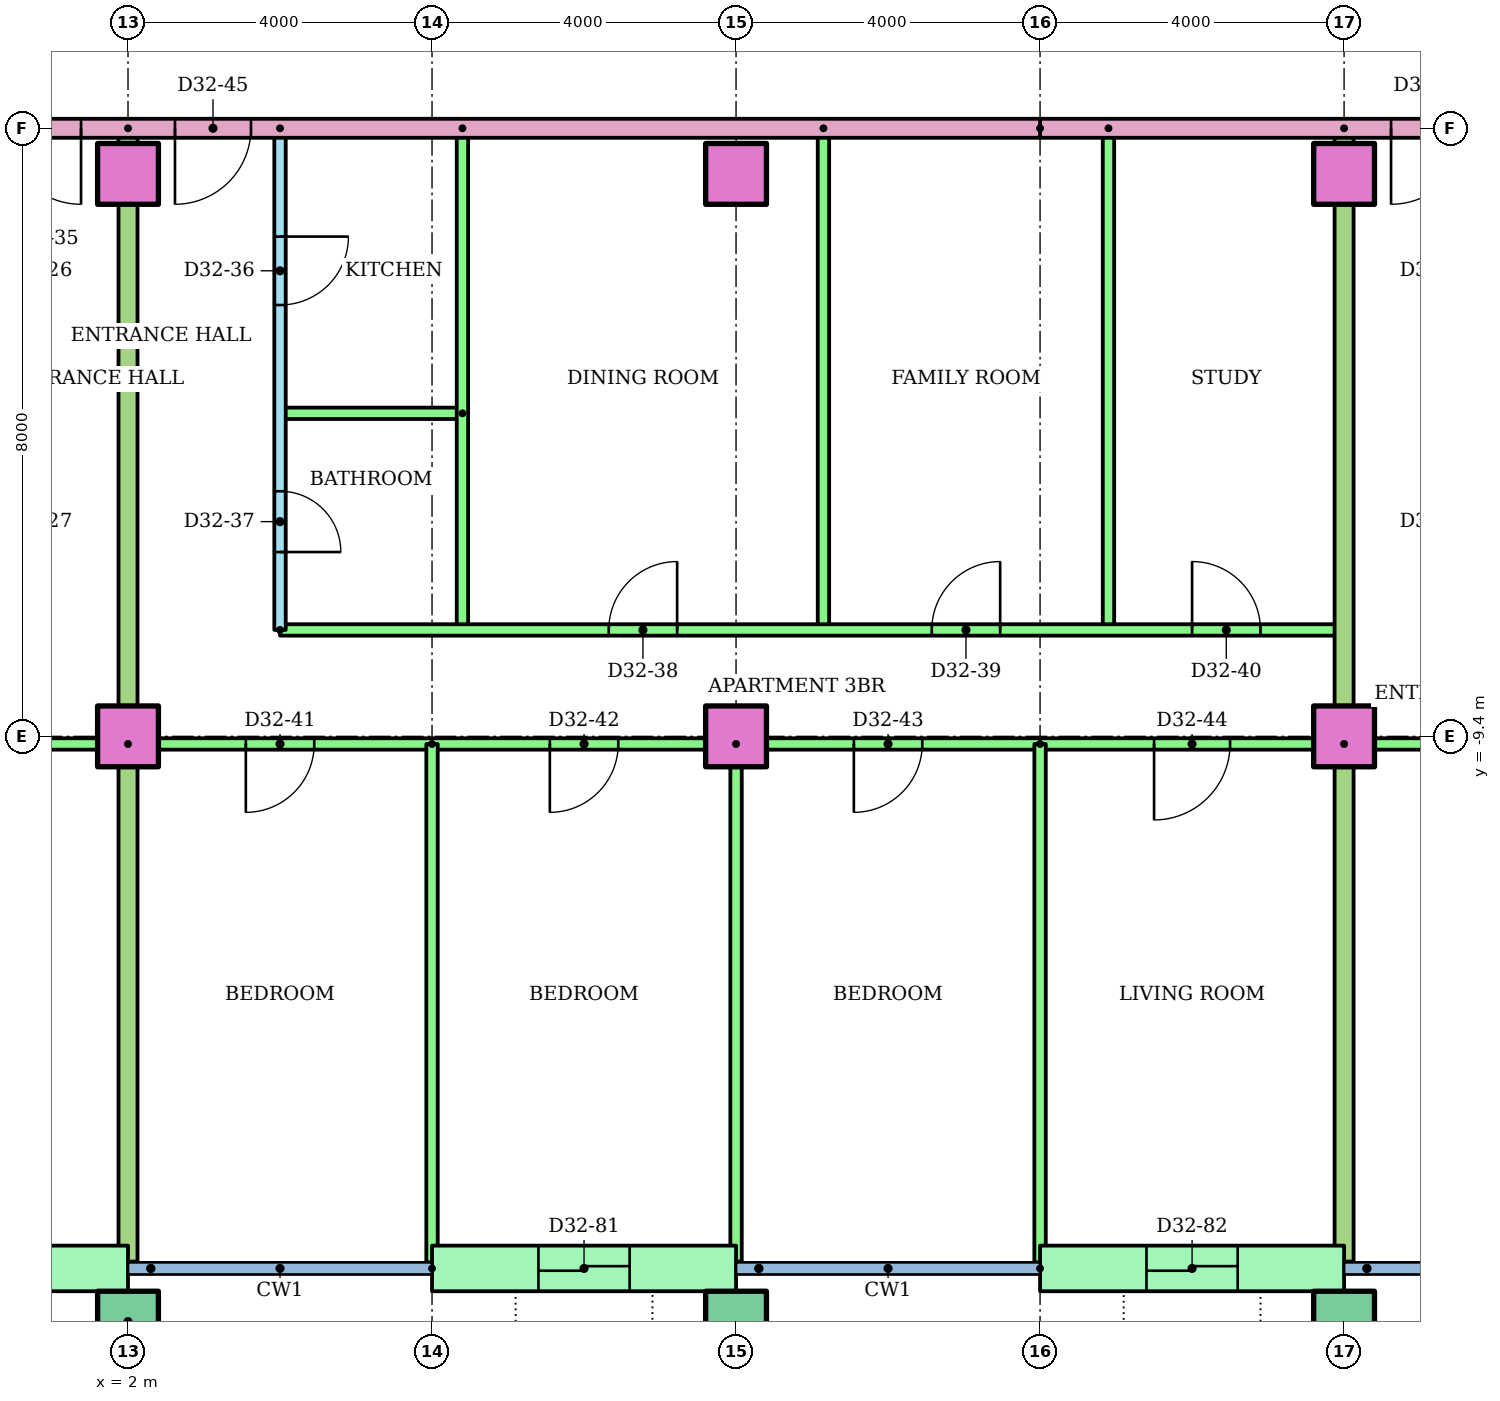
"""IFC4 building model, lengths in metres.
Left out: names, types, materials, properties, quantities, classifications, styles, units other than length and angle.
Written with IfcOpenShell. Run it as: python <this file> out.ifc"""

import sys

from ifc_helpers import new_model, si_unit, direction, frame, frame_2d, origin, origin_2d, place, context, subcontext, project, spatial, rectangle, hollow_rectangle, extrude, element, fill, save


model = new_model("IFC4")
c1 = context("Model", 3, precision=1e-05, world=origin(), true_north=direction((0.0, 1.0)))
c2 = subcontext(c1, "Body", "Model", "MODEL_VIEW")
j1 = project(units=[si_unit("LENGTHUNIT", "METRE"), si_unit("PLANEANGLEUNIT", "RADIAN")], contexts=[c1])
p1 = place(None, origin())
s1 = spatial("IfcSite", under=j1, at=p1, CompositionType="ELEMENT")
p2 = place(p1, origin())
s2 = spatial("IfcBuilding", under=s1, at=p2, CompositionType="ELEMENT")
p3 = place(p2, frame((0.0, 0.0, 126.2)))
s3 = spatial("IfcBuildingStorey", under=s2, at=p3, CompositionType="ELEMENT", Elevation=126.2)
for number, where in (
    (1, (2.0, -17.1, 0.0)),
    (2, (10.0, -17.1, 0.0)),
    (3, (18.0, -17.1, 0.0)),
):
    element("IfcColumn", number, at=place(p3, frame(where)), inside=s3, PredefinedType="COLUMN", context=c2, shape_type="SweptSolid", body=[
        extrude(hollow_rectangle(XDim=0.8, YDim=0.8, WallThickness=0.04, at=origin_2d()), origin(), (0.0, 0.0, 1.0), 3.2),
    ])
for number, where in (
    (4, (2.0, -9.4, 0.0)),
    (5, (10.0, -9.4, 0.0)),
    (6, (18.0, -9.4, 0.0)),
    (7, (2.0, -2.0, 0.0)),
    (8, (10.0, -2.0, 0.0)),
    (9, (18.0, -2.0, 0.0)),
):
    element("IfcColumn", number, at=place(p3, frame(where)), inside=s3, PredefinedType="COLUMN", context=c2, shape_type="SweptSolid", body=[
        extrude(rectangle(XDim=0.8, YDim=0.8, at=origin_2d()), origin(), (0.0, 0.0, 1.0), 3.2),
    ])
p4 = place(p3, frame((-2.0, -16.4, 0.0)))
e10 = element("IfcWall", 10, at=p4, inside=s3, PredefinedType="STANDARD", context=c2, shape_type="SweptSolid", body=[
    extrude(rectangle(XDim=4.0, YDim=0.6, at=frame_2d((2.0, 0.0))), origin(), (0.0, 0.0, 1.0), 2.92),
])
p5 = place(p4, frame((1.4, 0.0, 0.0)))
e11 = element("IfcOpeningElement", 11, at=p5, cuts=e10, PredefinedType="OPENING", context=c2, shape_type="SweptSolid", body=[
    extrude(rectangle(XDim=1.2, YDim=2.1, at=frame_2d((0.6, 1.05))), frame((0.0, 0.31, 0.0), z_axis=(0.0, -1.0, 0.0), x_axis=(1.0, 0.0, 0.0)), (0.0, 0.0, 1.0), 0.62),
])
p6 = place(p3, frame((6.0, -16.4, 0.0)))
e12 = element("IfcWall", 12, at=p6, inside=s3, PredefinedType="STANDARD", context=c2, shape_type="SweptSolid", body=[
    extrude(rectangle(XDim=4.0, YDim=0.6, at=frame_2d((2.0, 0.0))), origin(), (0.0, 0.0, 1.0), 2.92),
])
p7 = place(p6, frame((1.4, 0.0, 0.0)))
e13 = element("IfcOpeningElement", 13, at=p7, cuts=e12, PredefinedType="OPENING", context=c2, shape_type="SweptSolid", body=[
    extrude(rectangle(XDim=1.2, YDim=2.1, at=frame_2d((0.6, 1.05))), frame((0.0, 0.31, 0.0), z_axis=(0.0, -1.0, 0.0), x_axis=(1.0, 0.0, 0.0)), (0.0, 0.0, 1.0), 0.62),
])
p8 = place(p3, frame((14.0, -16.4, 0.0)))
e14 = element("IfcWall", 14, at=p8, inside=s3, PredefinedType="STANDARD", context=c2, shape_type="SweptSolid", body=[
    extrude(rectangle(XDim=4.0, YDim=0.6, at=frame_2d((2.0, 0.0))), origin(), (0.0, 0.0, 1.0), 2.92),
])
p9 = place(p8, frame((1.4, 0.0, 0.0)))
e15 = element("IfcOpeningElement", 15, at=p9, cuts=e14, PredefinedType="OPENING", context=c2, shape_type="SweptSolid", body=[
    extrude(rectangle(XDim=1.2, YDim=2.1, at=frame_2d((0.6, 1.05))), frame((0.0, 0.31, 0.0), z_axis=(0.0, -1.0, 0.0), x_axis=(1.0, 0.0, 0.0)), (0.0, 0.0, 1.0), 0.62),
])
p10 = place(p3, frame((2.0, -9.5, 0.0), z_axis=(0.0, 0.0, 1.0), x_axis=(-1.0, 0.0, 0.0)))
e16 = element("IfcWall", 16, at=p10, inside=s3, PredefinedType="PARTITIONING", context=c2, shape_type="SweptSolid", body=[
    extrude(rectangle(XDim=16.0, YDim=0.15, at=frame_2d((8.0, 0.0))), origin(), (0.0, 0.0, 1.0), 2.4),
])
p11 = place(p10, frame((13.55, 0.0, 0.0)))
e17 = element("IfcOpeningElement", 17, at=p11, cuts=e16, PredefinedType="OPENING", context=c2, shape_type="SweptSolid", body=[
    extrude(rectangle(XDim=0.9, YDim=2.1, at=frame_2d((0.45, 1.05))), frame((0.0, 0.085, 0.0), z_axis=(0.0, -1.0, 0.0), x_axis=(1.0, 0.0, 0.0)), (0.0, 0.0, 1.0), 0.17),
])
p12 = place(p10, frame((9.5, 0.0, 0.0)))
e18 = element("IfcOpeningElement", 18, at=p12, cuts=e16, PredefinedType="OPENING", context=c2, shape_type="SweptSolid", body=[
    extrude(rectangle(XDim=1.0, YDim=2.1, at=frame_2d((0.5, 1.05))), frame((0.0, 0.085, 0.0), z_axis=(0.0, -1.0, 0.0), x_axis=(1.0, 0.0, 0.0)), (0.0, 0.0, 1.0), 0.17),
])
p13 = place(p10, frame((5.55, 0.0, 0.0)))
e19 = element("IfcOpeningElement", 19, at=p13, cuts=e16, PredefinedType="OPENING", context=c2, shape_type="SweptSolid", body=[
    extrude(rectangle(XDim=0.9, YDim=2.1, at=frame_2d((0.45, 1.05))), frame((0.0, 0.085, 0.0), z_axis=(0.0, -1.0, 0.0), x_axis=(1.0, 0.0, 0.0)), (0.0, 0.0, 1.0), 0.17),
])
p14 = place(p10, frame((1.55, 0.0, 0.0)))
e20 = element("IfcOpeningElement", 20, at=p14, cuts=e16, PredefinedType="OPENING", context=c2, shape_type="SweptSolid", body=[
    extrude(rectangle(XDim=0.9, YDim=2.1, at=frame_2d((0.45, 1.05))), frame((0.0, 0.085, 0.0), z_axis=(0.0, -1.0, 0.0), x_axis=(1.0, 0.0, 0.0)), (0.0, 0.0, 1.0), 0.17),
])
p15 = place(p3, frame((4.0, -1.4, 0.0), z_axis=(0.0, 0.0, 1.0), x_axis=(0.0, -1.0, 0.0)))
e21 = element("IfcWall", 21, at=p15, inside=s3, PredefinedType="PARTITIONING", context=c2, shape_type="SweptSolid", body=[
    extrude(rectangle(XDim=6.6, YDim=0.15, at=frame_2d((3.3, 0.0))), origin(), (0.0, 0.0, 1.0), 2.4),
])
p16 = place(p15, frame((1.425, 0.0, 0.0)))
e22 = element("IfcOpeningElement", 22, at=p16, cuts=e21, PredefinedType="OPENING", context=c2, shape_type="SweptSolid", body=[
    extrude(rectangle(XDim=0.9, YDim=2.1, at=frame_2d((0.45, 1.05))), frame((0.0, 0.085, 0.0), z_axis=(0.0, -1.0, 0.0), x_axis=(1.0, 0.0, 0.0)), (0.0, 0.0, 1.0), 0.17),
])
p17 = place(p15, frame((4.775, 0.0, 0.0)))
e23 = element("IfcOpeningElement", 23, at=p17, cuts=e21, PredefinedType="OPENING", context=c2, shape_type="SweptSolid", body=[
    extrude(rectangle(XDim=0.8, YDim=2.1, at=frame_2d((0.4, 1.05))), frame((0.0, 0.085, 0.0), z_axis=(0.0, -1.0, 0.0), x_axis=(1.0, 0.0, 0.0)), (0.0, 0.0, 1.0), 0.17),
])
p18 = place(p3, frame((6.4, -5.15, 0.0), z_axis=(0.0, 0.0, 1.0), x_axis=(-1.0, 0.0, 0.0)))
e24 = element("IfcWall", 24, at=p18, inside=s3, PredefinedType="PARTITIONING", context=c2, shape_type="SweptSolid", body=[
    extrude(rectangle(XDim=2.4, YDim=0.15, at=frame_2d((1.2, 0.0))), origin(), (0.0, 0.0, 1.0), 2.4),
])
for number, where, z_axis, x_axis in (
    (25, (6.4, -1.4, 0.0), (0.0, 0.0, 1.0), (0.0, -1.0, 0.0)),
    (26, (11.15, -1.4, 0.0), (0.0, 0.0, 1.0), (0.0, -1.0, 0.0)),
    (27, (14.9, -1.4, 0.0), (0.0, 0.0, 1.0), (0.0, -1.0, 0.0)),
):
    element("IfcWall", number, at=place(p3, frame(where, z_axis=z_axis, x_axis=x_axis)), inside=s3, PredefinedType="PARTITIONING", context=c2, shape_type="SweptSolid", body=[
        extrude(rectangle(XDim=6.6, YDim=0.15, at=frame_2d((3.3, 0.0))), origin(), (0.0, 0.0, 1.0), 2.4),
    ])
p19 = place(p3, frame((4.0, -8.0, 0.0)))
e28 = element("IfcWall", 28, at=p19, inside=s3, PredefinedType="PARTITIONING", context=c2, shape_type="SweptSolid", body=[
    extrude(rectangle(XDim=14.0, YDim=0.15, at=frame_2d((7.0, 0.0))), origin(), (0.0, 0.0, 1.0), 2.4),
])
p20 = place(p19, frame((4.325, 0.0, 0.0)))
e29 = element("IfcOpeningElement", 29, at=p20, cuts=e28, PredefinedType="OPENING", context=c2, shape_type="SweptSolid", body=[
    extrude(rectangle(XDim=0.9, YDim=2.1, at=frame_2d((0.45, 1.05))), frame((0.0, 0.085, 0.0), z_axis=(0.0, -1.0, 0.0), x_axis=(1.0, 0.0, 0.0)), (0.0, 0.0, 1.0), 0.17),
])
p21 = place(p19, frame((8.575, 0.0, 0.0)))
e30 = element("IfcOpeningElement", 30, at=p21, cuts=e28, PredefinedType="OPENING", context=c2, shape_type="SweptSolid", body=[
    extrude(rectangle(XDim=0.9, YDim=2.1, at=frame_2d((0.45, 1.05))), frame((0.0, 0.085, 0.0), z_axis=(0.0, -1.0, 0.0), x_axis=(1.0, 0.0, 0.0)), (0.0, 0.0, 1.0), 0.17),
])
p22 = place(p19, frame((12.0, 0.0, 0.0)))
e31 = element("IfcOpeningElement", 31, at=p22, cuts=e28, PredefinedType="OPENING", context=c2, shape_type="SweptSolid", body=[
    extrude(rectangle(XDim=0.9, YDim=2.1, at=frame_2d((0.45, 1.05))), frame((0.0, 0.085, 0.0), z_axis=(0.0, -1.0, 0.0), x_axis=(1.0, 0.0, 0.0)), (0.0, 0.0, 1.0), 0.17),
])
p23 = place(p3, frame((18.0, -9.5, 0.0), z_axis=(0.0, 0.0, 1.0), x_axis=(-1.0, 0.0, 0.0)))
e32 = element("IfcWall", 32, at=p23, inside=s3, PredefinedType="PARTITIONING", context=c2, shape_type="SweptSolid", body=[
    extrude(rectangle(XDim=16.0, YDim=0.15, at=frame_2d((8.0, 0.0))), origin(), (0.0, 0.0, 1.0), 2.4),
])
p24 = place(p23, frame((13.55, 0.0, 0.0)))
e33 = element("IfcOpeningElement", 33, at=p24, cuts=e32, PredefinedType="OPENING", context=c2, shape_type="SweptSolid", body=[
    extrude(rectangle(XDim=0.9, YDim=2.1, at=frame_2d((0.45, 1.05))), frame((0.0, 0.085, 0.0), z_axis=(0.0, -1.0, 0.0), x_axis=(1.0, 0.0, 0.0)), (0.0, 0.0, 1.0), 0.17),
])
p25 = place(p23, frame((9.55, 0.0, 0.0)))
e34 = element("IfcOpeningElement", 34, at=p25, cuts=e32, PredefinedType="OPENING", context=c2, shape_type="SweptSolid", body=[
    extrude(rectangle(XDim=0.9, YDim=2.1, at=frame_2d((0.45, 1.05))), frame((0.0, 0.085, 0.0), z_axis=(0.0, -1.0, 0.0), x_axis=(1.0, 0.0, 0.0)), (0.0, 0.0, 1.0), 0.17),
])
p26 = place(p23, frame((5.55, 0.0, 0.0)))
e35 = element("IfcOpeningElement", 35, at=p26, cuts=e32, PredefinedType="OPENING", context=c2, shape_type="SweptSolid", body=[
    extrude(rectangle(XDim=0.9, YDim=2.1, at=frame_2d((0.45, 1.05))), frame((0.0, 0.085, 0.0), z_axis=(0.0, -1.0, 0.0), x_axis=(1.0, 0.0, 0.0)), (0.0, 0.0, 1.0), 0.17),
])
p27 = place(p23, frame((1.5, 0.0, 0.0)))
e36 = element("IfcOpeningElement", 36, at=p27, cuts=e32, PredefinedType="OPENING", context=c2, shape_type="SweptSolid", body=[
    extrude(rectangle(XDim=1.0, YDim=2.1, at=frame_2d((0.5, 1.05))), frame((0.0, 0.085, 0.0), z_axis=(0.0, -1.0, 0.0), x_axis=(1.0, 0.0, 0.0)), (0.0, 0.0, 1.0), 0.17),
])
p28 = place(p3, frame((6.0, -9.5, 0.0), z_axis=(0.0, 0.0, 1.0), x_axis=(0.0, -1.0, 0.0)))
e37 = element("IfcWall", 37, at=p28, inside=s3, PredefinedType="PARTITIONING", context=c2, shape_type="SweptSolid", body=[
    extrude(rectangle(XDim=6.821, YDim=0.15, at=frame_2d((3.411, 0.0))), origin(), (0.0, 0.0, 1.0), 2.4),
])
p29 = place(p3, frame((10.0, -9.5, 0.0), z_axis=(0.0, 0.0, 1.0), x_axis=(0.0, -1.0, 0.0)))
e38 = element("IfcWall", 38, at=p29, inside=s3, PredefinedType="PARTITIONING", context=c2, shape_type="SweptSolid", body=[
    extrude(rectangle(XDim=6.81, YDim=0.15, at=frame_2d((3.405, 0.0))), origin(), (0.0, 0.0, 1.0), 2.4),
])
p30 = place(p3, frame((14.0, -9.5, 0.0), z_axis=(0.0, 0.0, 1.0), x_axis=(0.0, -1.0, 0.0)))
e39 = element("IfcWall", 39, at=p30, inside=s3, PredefinedType="PARTITIONING", context=c2, shape_type="SweptSolid", body=[
    extrude(rectangle(XDim=6.821, YDim=0.15, at=frame_2d((3.411, 0.0))), origin(), (0.0, 0.0, 1.0), 2.4),
])
p31 = place(p3, frame((2.0, -1.4, 0.0), z_axis=(0.0, 0.0, 1.0), x_axis=(0.0, -1.0, 0.0)))
e40 = element("IfcWall", 40, at=p31, inside=s3, PredefinedType="PARTITIONING", context=c2, shape_type="SweptSolid", body=[
    extrude(rectangle(XDim=14.91, YDim=0.25, at=frame_2d((7.455, 0.0))), origin(), (0.0, 0.0, 1.0), 2.4),
])
p32 = place(p3, frame((32.72, -9.5, 0.0), z_axis=(0.0, 0.0, 1.0), x_axis=(-1.0, 0.0, 0.0)))
e41 = element("IfcWall", 41, at=p32, inside=s3, PredefinedType="PARTITIONING", context=c2, shape_type="SweptSolid", body=[
    extrude(rectangle(XDim=14.72, YDim=0.15, at=frame_2d((7.36, 0.0))), origin(), (0.0, 0.0, 1.0), 2.4),
])
p33 = place(p32, frame((10.22, 0.0, 0.0)))
e42 = element("IfcOpeningElement", 42, at=p33, cuts=e41, PredefinedType="OPENING", context=c2, shape_type="SweptSolid", body=[
    extrude(rectangle(XDim=1.0, YDim=2.1, at=frame_2d((0.5, 1.05))), frame((0.0, 0.085, 0.0), z_axis=(0.0, -1.0, 0.0), x_axis=(1.0, 0.0, 0.0)), (0.0, 0.0, 1.0), 0.17),
])
p34 = place(p32, frame((3.02, 0.0, 0.0)))
e43 = element("IfcOpeningElement", 43, at=p34, cuts=e41, PredefinedType="OPENING", context=c2, shape_type="SweptSolid", body=[
    extrude(rectangle(XDim=0.9, YDim=2.1, at=frame_2d((0.45, 1.05))), frame((0.0, 0.085, 0.0), z_axis=(0.0, -1.0, 0.0), x_axis=(1.0, 0.0, 0.0)), (0.0, 0.0, 1.0), 0.17),
])
p35 = place(p3, frame((18.0, -1.4, 0.0), z_axis=(0.0, 0.0, 1.0), x_axis=(0.0, -1.0, 0.0)))
e44 = element("IfcWall", 44, at=p35, inside=s3, PredefinedType="PARTITIONING", context=c2, shape_type="SweptSolid", body=[
    extrude(rectangle(XDim=14.91, YDim=0.25, at=frame_2d((7.455, 0.0))), origin(), (0.0, 0.0, 1.0), 2.4),
])
p36 = place(p3, frame((29.0, -1.4, 0.0), z_axis=(0.0, 0.0, 1.0), x_axis=(-1.0, 0.0, 0.0)))
e45 = element("IfcWall", 45, at=p36, inside=s3, PredefinedType="PARTITIONING", context=c2, shape_type="SweptSolid", body=[
    extrude(rectangle(XDim=15.0, YDim=0.25, at=frame_2d((7.5, 0.0))), origin(), (0.0, 0.0, 1.0), 2.4),
])
p37 = place(p36, frame((9.382, 0.0, 0.0)))
e46 = element("IfcOpeningElement", 46, at=p37, cuts=e45, PredefinedType="OPENING", context=c2, shape_type="SweptSolid", body=[
    extrude(rectangle(XDim=1.0, YDim=2.1, at=frame_2d((0.5, 1.05))), frame((0.0, 0.135, 0.0), z_axis=(0.0, -1.0, 0.0), x_axis=(1.0, 0.0, 0.0)), (0.0, 0.0, 1.0), 0.27),
])
p38 = place(p3, frame((14.0, -1.4, 0.0), z_axis=(0.0, 0.0, 1.0), x_axis=(-1.0, 0.0, 0.0)))
e47 = element("IfcWall", 47, at=p38, inside=s3, PredefinedType="PARTITIONING", context=c2, shape_type="SweptSolid", body=[
    extrude(rectangle(XDim=28.0, YDim=0.25, at=frame_2d((14.0, 0.0))), origin(), (0.0, 0.0, 1.0), 2.4),
])
p39 = place(p38, frame((12.618, 0.0, 0.0)))
e48 = element("IfcOpeningElement", 48, at=p39, cuts=e47, PredefinedType="OPENING", context=c2, shape_type="SweptSolid", body=[
    extrude(rectangle(XDim=1.0, YDim=2.1, at=frame_2d((0.5, 1.05))), frame((0.0, 0.135, 0.0), z_axis=(0.0, -1.0, 0.0), x_axis=(1.0, 0.0, 0.0)), (0.0, 0.0, 1.0), 0.27),
])
p40 = place(p38, frame((10.382, 0.0, 0.0)))
e49 = element("IfcOpeningElement", 49, at=p40, cuts=e47, PredefinedType="OPENING", context=c2, shape_type="SweptSolid", body=[
    extrude(rectangle(XDim=1.0, YDim=2.1, at=frame_2d((0.5, 1.05))), frame((0.0, 0.135, 0.0), z_axis=(0.0, -1.0, 0.0), x_axis=(1.0, 0.0, 0.0)), (0.0, 0.0, 1.0), 0.27),
])
p41 = place(p39, origin())
e50 = element("IfcDoor", 50, at=p41, inside=s3, OperationType="SINGLE_SWING_LEFT", PredefinedType="DOOR", context=c2, shape_type="SweptSolid", body=[
    extrude(rectangle(XDim=1.0, YDim=2.1, at=frame_2d((0.5, 1.05))), frame((0.0, 0.025, 0.0), z_axis=(0.0, -1.0, 0.0), x_axis=(1.0, 0.0, 0.0)), (0.0, 0.0, 1.0), 0.05),
])
fill(e48, e50)
p42 = place(p16, origin())
e51 = element("IfcDoor", 51, at=p42, inside=s3, OperationType="SINGLE_SWING_LEFT", PredefinedType="DOOR", context=c2, shape_type="SweptSolid", body=[
    extrude(rectangle(XDim=0.9, YDim=2.1, at=frame_2d((0.45, 1.05))), frame((0.0, 0.025, 0.0), z_axis=(0.0, -1.0, 0.0), x_axis=(1.0, 0.0, 0.0)), (0.0, 0.0, 1.0), 0.05),
])
fill(e22, e51)
p43 = place(p17, origin())
e52 = element("IfcDoor", 52, at=p43, inside=s3, OperationType="SINGLE_SWING_RIGHT", PredefinedType="DOOR", context=c2, shape_type="SweptSolid", body=[
    extrude(rectangle(XDim=0.8, YDim=2.1, at=frame_2d((0.4, 1.05))), frame((0.0, 0.025, 0.0), z_axis=(0.0, -1.0, 0.0), x_axis=(1.0, 0.0, 0.0)), (0.0, 0.0, 1.0), 0.05),
])
fill(e23, e52)
p44 = place(p20, origin())
e53 = element("IfcDoor", 53, at=p44, inside=s3, OperationType="SINGLE_SWING_RIGHT", PredefinedType="DOOR", context=c2, shape_type="SweptSolid", body=[
    extrude(rectangle(XDim=0.9, YDim=2.1, at=frame_2d((0.45, 1.05))), frame((0.0, 0.025, 0.0), z_axis=(0.0, -1.0, 0.0), x_axis=(1.0, 0.0, 0.0)), (0.0, 0.0, 1.0), 0.05),
])
fill(e29, e53)
p45 = place(p21, origin())
e54 = element("IfcDoor", 54, at=p45, inside=s3, OperationType="SINGLE_SWING_RIGHT", PredefinedType="DOOR", context=c2, shape_type="SweptSolid", body=[
    extrude(rectangle(XDim=0.9, YDim=2.1, at=frame_2d((0.45, 1.05))), frame((0.0, 0.025, 0.0), z_axis=(0.0, -1.0, 0.0), x_axis=(1.0, 0.0, 0.0)), (0.0, 0.0, 1.0), 0.05),
])
fill(e30, e54)
p46 = place(p22, origin())
e55 = element("IfcDoor", 55, at=p46, inside=s3, OperationType="SINGLE_SWING_LEFT", PredefinedType="DOOR", context=c2, shape_type="SweptSolid", body=[
    extrude(rectangle(XDim=0.9, YDim=2.1, at=frame_2d((0.45, 1.05))), frame((0.0, 0.025, 0.0), z_axis=(0.0, -1.0, 0.0), x_axis=(1.0, 0.0, 0.0)), (0.0, 0.0, 1.0), 0.05),
])
fill(e31, e55)
p47 = place(p24, origin())
e56 = element("IfcDoor", 56, at=p47, inside=s3, OperationType="SINGLE_SWING_RIGHT", PredefinedType="DOOR", context=c2, shape_type="SweptSolid", body=[
    extrude(rectangle(XDim=0.9, YDim=2.1, at=frame_2d((0.45, 1.05))), frame((0.0, 0.025, 0.0), z_axis=(0.0, -1.0, 0.0), x_axis=(1.0, 0.0, 0.0)), (0.0, 0.0, 1.0), 0.05),
])
fill(e33, e56)
p48 = place(p25, origin())
e57 = element("IfcDoor", 57, at=p48, inside=s3, OperationType="SINGLE_SWING_RIGHT", PredefinedType="DOOR", context=c2, shape_type="SweptSolid", body=[
    extrude(rectangle(XDim=0.9, YDim=2.1, at=frame_2d((0.45, 1.05))), frame((0.0, 0.025, 0.0), z_axis=(0.0, -1.0, 0.0), x_axis=(1.0, 0.0, 0.0)), (0.0, 0.0, 1.0), 0.05),
])
fill(e34, e57)
p49 = place(p26, origin())
e58 = element("IfcDoor", 58, at=p49, inside=s3, OperationType="SINGLE_SWING_RIGHT", PredefinedType="DOOR", context=c2, shape_type="SweptSolid", body=[
    extrude(rectangle(XDim=0.9, YDim=2.1, at=frame_2d((0.45, 1.05))), frame((0.0, 0.025, 0.0), z_axis=(0.0, -1.0, 0.0), x_axis=(1.0, 0.0, 0.0)), (0.0, 0.0, 1.0), 0.05),
])
fill(e35, e58)
p50 = place(p27, origin())
e59 = element("IfcDoor", 59, at=p50, inside=s3, OperationType="SINGLE_SWING_RIGHT", PredefinedType="DOOR", context=c2, shape_type="SweptSolid", body=[
    extrude(rectangle(XDim=1.0, YDim=2.1, at=frame_2d((0.5, 1.05))), frame((0.0, 0.025, 0.0), z_axis=(0.0, -1.0, 0.0), x_axis=(1.0, 0.0, 0.0)), (0.0, 0.0, 1.0), 0.05),
])
fill(e36, e59)
p51 = place(p40, origin())
e60 = element("IfcDoor", 60, at=p51, inside=s3, OperationType="SINGLE_SWING_RIGHT", PredefinedType="DOOR", context=c2, shape_type="SweptSolid", body=[
    extrude(rectangle(XDim=1.0, YDim=2.1, at=frame_2d((0.5, 1.05))), frame((0.0, 0.025, 0.0), z_axis=(0.0, -1.0, 0.0), x_axis=(1.0, 0.0, 0.0)), (0.0, 0.0, 1.0), 0.05),
])
fill(e49, e60)
p52 = place(p37, origin())
e61 = element("IfcDoor", 61, at=p52, inside=s3, OperationType="SINGLE_SWING_RIGHT", PredefinedType="DOOR", context=c2, shape_type="SweptSolid", body=[
    extrude(rectangle(XDim=1.0, YDim=2.1, at=frame_2d((0.5, 1.05))), frame((0.0, 0.025, 0.0), z_axis=(0.0, -1.0, 0.0), x_axis=(1.0, 0.0, 0.0)), (0.0, 0.0, 1.0), 0.05),
])
fill(e46, e61)
p53 = place(p7, origin())
e62 = element("IfcDoor", 62, at=p53, inside=s3, OperationType="SLIDING_TO_LEFT", PredefinedType="DOOR", context=c2, shape_type="SweptSolid", body=[
    extrude(rectangle(XDim=1.2, YDim=2.1, at=frame_2d((0.6, 1.05))), frame((0.0, 0.025, 0.0), z_axis=(0.0, -1.0, 0.0), x_axis=(1.0, 0.0, 0.0)), (0.0, 0.0, 1.0), 0.05),
])
fill(e13, e62)
p54 = place(p9, origin())
e63 = element("IfcDoor", 63, at=p54, inside=s3, OperationType="SLIDING_TO_LEFT", PredefinedType="DOOR", context=c2, shape_type="SweptSolid", body=[
    extrude(rectangle(XDim=1.2, YDim=2.1, at=frame_2d((0.6, 1.05))), frame((0.0, 0.025, 0.0), z_axis=(0.0, -1.0, 0.0), x_axis=(1.0, 0.0, 0.0)), (0.0, 0.0, 1.0), 0.05),
])
fill(e15, e63)
save(model, sys.argv[1])
